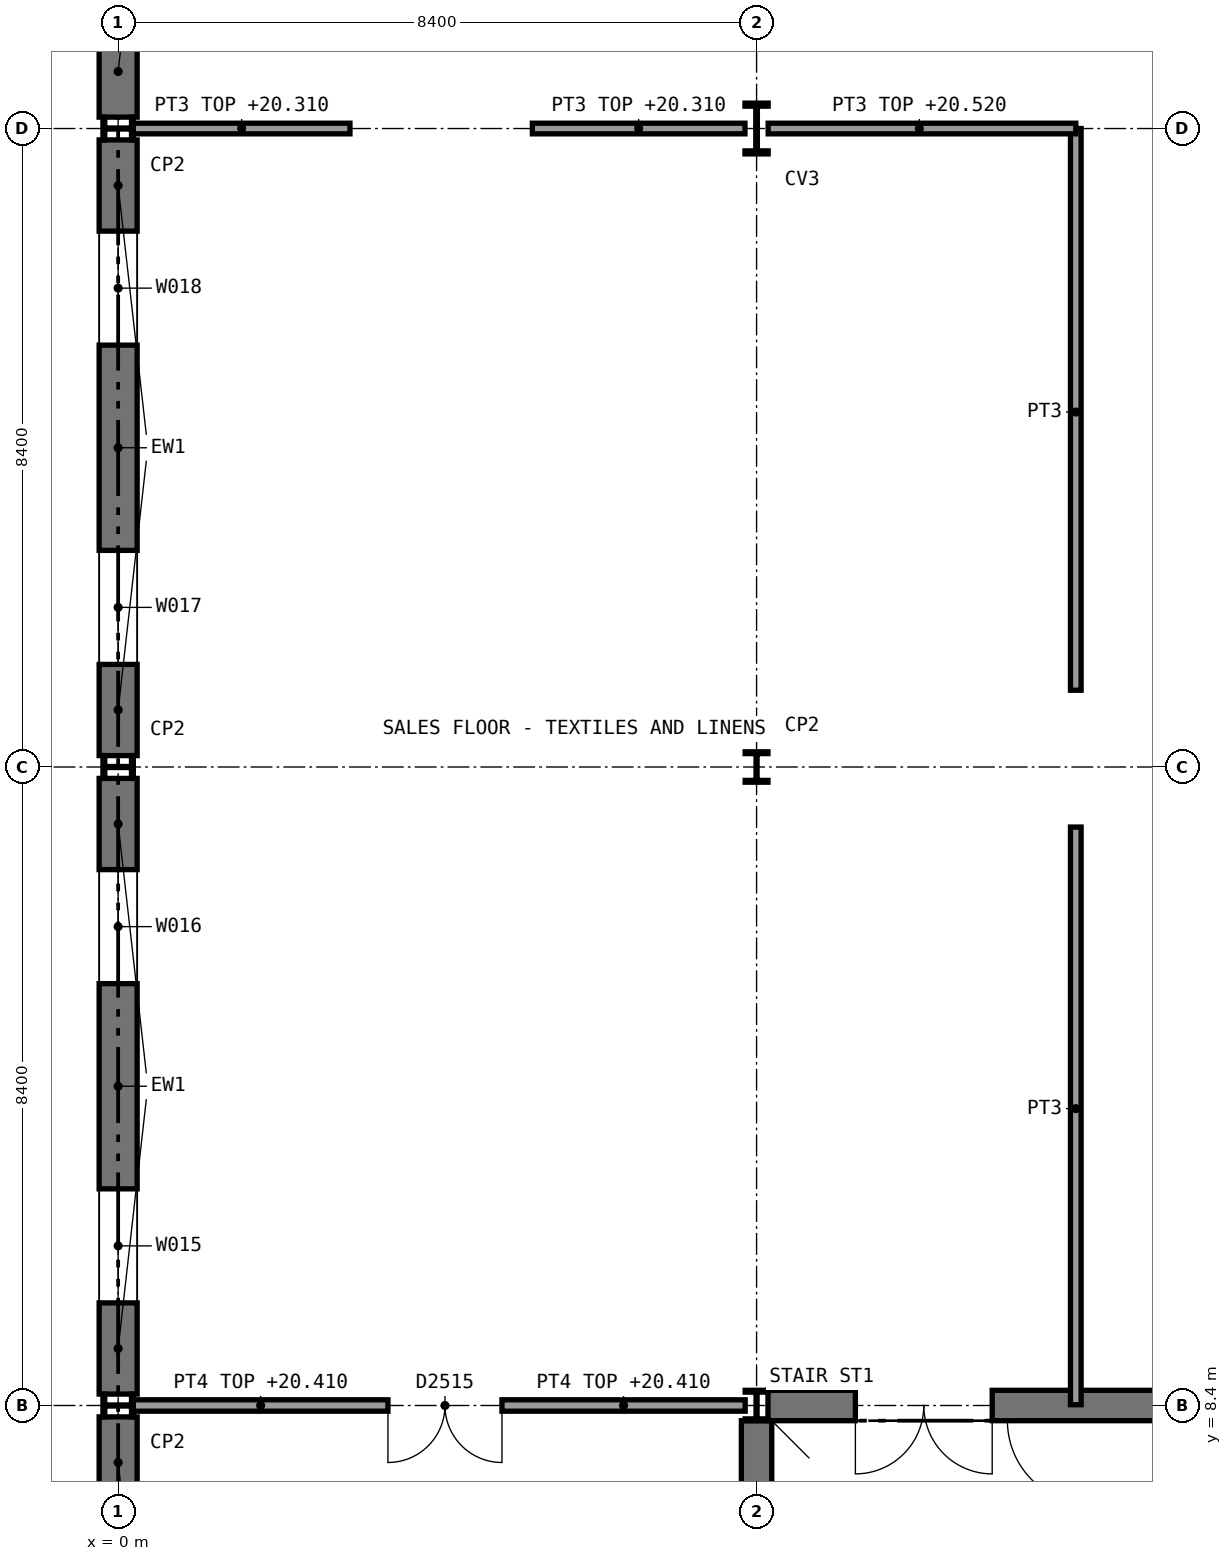
"""IFC4 building model, lengths in metres.
Left out: names, types, materials, properties, quantities, classifications, styles, units other than length and angle.
Written with IfcOpenShell. Run it as: python <this file> out.ifc"""

import sys

from ifc_helpers import new_model, si_unit, direction, frame, frame_2d, origin, origin_2d, place, context, subcontext, project, spatial, rectangle, i_section, extrude, element, fill, save


model = new_model("IFC4")
c1 = context("Model", 3, precision=1e-05, world=origin(), true_north=direction((0.0, 1.0)))
c2 = subcontext(c1, "Body", "Model", "MODEL_VIEW")
j1 = project(units=[si_unit("LENGTHUNIT", "METRE"), si_unit("PLANEANGLEUNIT", "RADIAN")], contexts=[c1])
p1 = place(None, origin())
s1 = spatial("IfcSite", under=j1, at=p1, CompositionType="ELEMENT")
p2 = place(p1, origin())
s2 = spatial("IfcBuilding", under=s1, at=p2, CompositionType="ELEMENT")
p3 = place(p2, frame((0.0, 0.0, 16.2)))
s3 = spatial("IfcBuildingStorey", under=s2, at=p3, CompositionType="ELEMENT", Elevation=16.2)
p4 = place(p3, frame((8.55, 8.4, 0.0), z_axis=(0.0, 0.0, 1.0), x_axis=(1.0, 0.0, 0.0)))
e1 = element("IfcWall", 1, at=p4, inside=s3, PredefinedType="SHEAR", context=c2, shape_type="SweptSolid", body=[
    extrude(rectangle(XDim=8.1, YDim=0.4, at=frame_2d((4.05, 0.0))), origin(), (0.0, 0.0, 1.0), 4.65),
])
p5 = place(p4, frame((1.15, 0.0, 0.0)))
e2 = element("IfcOpeningElement", 2, at=p5, cuts=e1, PredefinedType="OPENING", context=c2, shape_type="SweptSolid", body=[
    extrude(rectangle(XDim=1.8, YDim=2.1, at=frame_2d((0.9, 1.05))), frame((0.0, 0.21, 0.0), z_axis=(0.0, -1.0, 0.0), x_axis=(1.0, 0.0, 0.0)), (0.0, 0.0, 1.0), 0.42),
])
p6 = place(p4, frame((5.3, 0.0, 0.0)))
e3 = element("IfcOpeningElement", 3, at=p6, cuts=e1, PredefinedType="OPENING", context=c2, shape_type="SweptSolid", body=[
    extrude(rectangle(XDim=1.8, YDim=2.1, at=frame_2d((0.9, 1.05))), frame((0.0, 0.21, 0.0), z_axis=(0.0, -1.0, 0.0), x_axis=(1.0, 0.0, 0.0)), (0.0, 0.0, 1.0), 0.42),
])
p7 = place(p3, frame((8.4, 0.2, 0.0), z_axis=(0.0, 0.0, 1.0), x_axis=(0.0, 1.0, 0.0)))
e4 = element("IfcWall", 4, at=p7, inside=s3, PredefinedType="SHEAR", context=c2, shape_type="SweptSolid", body=[
    extrude(rectangle(XDim=8.0, YDim=0.4, at=frame_2d((4.0, 0.0))), origin(), (0.0, 0.0, 1.0), 4.65),
])
for number, where, z_axis, x_axis in (
    (5, (0.0, 8.4, 0.0), (0.0, 0.0, 1.0), (0.0, 1.0, 0.0)),
    (6, (0.0, 16.8, 0.0), (0.0, 0.0, 1.0), (0.0, 1.0, 0.0)),
    (7, (0.0, 25.2, 0.0), (0.0, 0.0, 1.0), (0.0, 1.0, 0.0)),
    (8, (8.4, 8.4, 0.0), (0.0, 0.0, 1.0), (1.0, 0.0, 0.0)),
    (9, (8.4, 16.8, 0.0), (0.0, 0.0, 1.0), (1.0, 0.0, 0.0)),
):
    element("IfcColumn", number, at=place(p3, frame(where, z_axis=z_axis, x_axis=x_axis)), inside=s3, PredefinedType="COLUMN", context=c2, shape_type="SweptSolid", body=[
        extrude(i_section(OverallWidth=0.3, OverallDepth=0.4, WebThickness=0.013, FlangeThickness=0.024, FilletRadius=0.027, at=origin_2d()), origin(), (0.0, 0.0, 1.0), 4.8),
    ])
p8 = place(p3, frame((8.4, 25.2, 0.0), z_axis=(0.0, 0.0, 1.0), x_axis=(1.0, 0.0, 0.0)))
e10 = element("IfcColumn", 10, at=p8, inside=s3, PredefinedType="COLUMN", context=c2, shape_type="SweptSolid", body=[
    extrude(i_section(OverallWidth=0.305, OverallDepth=0.668, WebThickness=0.021, FlangeThickness=0.04, FilletRadius=0.027, at=origin_2d()), origin(), (0.0, 0.0, 1.0), 4.8),
])
p9 = place(p3, frame((0.2, 8.4, 0.0), z_axis=(0.0, 0.0, 1.0), x_axis=(1.0, 0.0, 0.0)))
e11 = element("IfcWall", 11, at=p9, inside=s3, PredefinedType="SOLIDWALL", context=c2, shape_type="SweptSolid", body=[
    extrude(rectangle(XDim=8.05, YDim=0.15, at=frame_2d((4.025, 0.0))), origin(), (0.0, 0.0, 1.0), 4.21),
])
p10 = place(p9, frame((3.35, 0.0, 0.0)))
e12 = element("IfcOpeningElement", 12, at=p10, cuts=e11, PredefinedType="OPENING", context=c2, shape_type="SweptSolid", body=[
    extrude(rectangle(XDim=1.5, YDim=2.1, at=frame_2d((0.75, 1.05))), frame((0.0, 0.085, 0.0), z_axis=(0.0, -1.0, 0.0), x_axis=(1.0, 0.0, 0.0)), (0.0, 0.0, 1.0), 0.17),
])
p11 = place(p3, frame((12.6, 8.41, 0.0), z_axis=(0.0, 0.0, 1.0), x_axis=(0.0, 1.0, 0.0)))
e13 = element("IfcWall", 13, at=p11, inside=s3, PredefinedType="PARTITIONING", context=c2, shape_type="SweptSolid", body=[
    extrude(rectangle(XDim=7.6, YDim=0.14, at=frame_2d((3.8, 0.0))), origin(), (0.0, 0.0, 1.0), 4.65),
])
p12 = place(p3, frame((12.6, 17.81, 0.0), z_axis=(0.0, 0.0, 1.0), x_axis=(0.0, 1.0, 0.0)))
e14 = element("IfcWall", 14, at=p12, inside=s3, PredefinedType="PARTITIONING", context=c2, shape_type="SweptSolid", body=[
    extrude(rectangle(XDim=7.39, YDim=0.14, at=frame_2d((3.695, 0.0))), origin(), (0.0, 0.0, 1.0), 4.65),
])
p13 = place(p3, frame((0.2, 25.2, 0.0), z_axis=(0.0, 0.0, 1.0), x_axis=(1.0, 0.0, 0.0)))
e15 = element("IfcWall", 15, at=p13, inside=s3, PredefinedType="PARTITIONING", context=c2, shape_type="SweptSolid", body=[
    extrude(rectangle(XDim=2.85, YDim=0.14, at=frame_2d((1.425, 0.0))), origin(), (0.0, 0.0, 1.0), 4.11),
])
p14 = place(p3, frame((5.45, 25.2, 0.0), z_axis=(0.0, 0.0, 1.0), x_axis=(1.0, 0.0, 0.0)))
e16 = element("IfcWall", 16, at=p14, inside=s3, PredefinedType="PARTITIONING", context=c2, shape_type="SweptSolid", body=[
    extrude(rectangle(XDim=2.797, YDim=0.14, at=frame_2d((1.399, 0.0))), origin(), (0.0, 0.0, 1.0), 4.11),
])
p15 = place(p3, frame((8.552, 25.2, 0.0), z_axis=(0.0, 0.0, 1.0), x_axis=(1.0, 0.0, 0.0)))
e17 = element("IfcWall", 17, at=p15, inside=s3, PredefinedType="PARTITIONING", context=c2, shape_type="SweptSolid", body=[
    extrude(rectangle(XDim=4.048, YDim=0.14, at=frame_2d((2.024, 0.0))), origin(), (0.0, 0.0, 1.0), 4.32),
])
p16 = place(p3, frame((0.0, 0.15, 0.0), z_axis=(0.0, 0.0, 1.0), x_axis=(0.0, 1.0, 0.0)))
e18 = element("IfcWall", 18, at=p16, inside=s3, PredefinedType="STANDARD", context=c2, shape_type="SweptSolid", body=[
    extrude(rectangle(XDim=8.1, YDim=0.5, at=frame_2d((4.05, 0.0))), origin(), (0.0, 0.0, 1.0), 4.65),
])
p17 = place(p16, frame((1.2, 0.0, 1.0)))
e19 = element("IfcOpeningElement", 19, at=p17, cuts=e18, PredefinedType="OPENING", context=c2, shape_type="SweptSolid", body=[
    extrude(rectangle(XDim=1.5, YDim=2.7, at=frame_2d((0.75, 1.35))), frame((0.0, 0.26, 0.0), z_axis=(0.0, -1.0, 0.0), x_axis=(1.0, 0.0, 0.0)), (0.0, 0.0, 1.0), 0.52),
])
p18 = place(p16, frame((5.4, 0.0, 1.0)))
e20 = element("IfcOpeningElement", 20, at=p18, cuts=e18, PredefinedType="OPENING", context=c2, shape_type="SweptSolid", body=[
    extrude(rectangle(XDim=1.5, YDim=2.7, at=frame_2d((0.75, 1.35))), frame((0.0, 0.26, 0.0), z_axis=(0.0, -1.0, 0.0), x_axis=(1.0, 0.0, 0.0)), (0.0, 0.0, 1.0), 0.52),
])
p19 = place(p3, frame((0.0, 8.55, 0.0), z_axis=(0.0, 0.0, 1.0), x_axis=(0.0, 1.0, 0.0)))
e21 = element("IfcWall", 21, at=p19, inside=s3, PredefinedType="STANDARD", context=c2, shape_type="SweptSolid", body=[
    extrude(rectangle(XDim=8.1, YDim=0.5, at=frame_2d((4.05, 0.0))), origin(), (0.0, 0.0, 1.0), 4.65),
])
p20 = place(p19, frame((1.2, 0.0, 1.0)))
e22 = element("IfcOpeningElement", 22, at=p20, cuts=e21, PredefinedType="OPENING", context=c2, shape_type="SweptSolid", body=[
    extrude(rectangle(XDim=1.5, YDim=2.7, at=frame_2d((0.75, 1.35))), frame((0.0, 0.26, 0.0), z_axis=(0.0, -1.0, 0.0), x_axis=(1.0, 0.0, 0.0)), (0.0, 0.0, 1.0), 0.52),
])
p21 = place(p19, frame((5.4, 0.0, 1.0)))
e23 = element("IfcOpeningElement", 23, at=p21, cuts=e21, PredefinedType="OPENING", context=c2, shape_type="SweptSolid", body=[
    extrude(rectangle(XDim=1.5, YDim=2.7, at=frame_2d((0.75, 1.35))), frame((0.0, 0.26, 0.0), z_axis=(0.0, -1.0, 0.0), x_axis=(1.0, 0.0, 0.0)), (0.0, 0.0, 1.0), 0.52),
])
p22 = place(p3, frame((0.0, 16.95, 0.0), z_axis=(0.0, 0.0, 1.0), x_axis=(0.0, 1.0, 0.0)))
e24 = element("IfcWall", 24, at=p22, inside=s3, PredefinedType="STANDARD", context=c2, shape_type="SweptSolid", body=[
    extrude(rectangle(XDim=8.1, YDim=0.5, at=frame_2d((4.05, 0.0))), origin(), (0.0, 0.0, 1.0), 4.65),
])
p23 = place(p22, frame((1.2, 0.0, 1.0)))
e25 = element("IfcOpeningElement", 25, at=p23, cuts=e24, PredefinedType="OPENING", context=c2, shape_type="SweptSolid", body=[
    extrude(rectangle(XDim=1.5, YDim=2.7, at=frame_2d((0.75, 1.35))), frame((0.0, 0.26, 0.0), z_axis=(0.0, -1.0, 0.0), x_axis=(1.0, 0.0, 0.0)), (0.0, 0.0, 1.0), 0.52),
])
p24 = place(p22, frame((5.4, 0.0, 1.0)))
e26 = element("IfcOpeningElement", 26, at=p24, cuts=e24, PredefinedType="OPENING", context=c2, shape_type="SweptSolid", body=[
    extrude(rectangle(XDim=1.5, YDim=2.7, at=frame_2d((0.75, 1.35))), frame((0.0, 0.26, 0.0), z_axis=(0.0, -1.0, 0.0), x_axis=(1.0, 0.0, 0.0)), (0.0, 0.0, 1.0), 0.52),
])
p25 = place(p3, frame((0.0, 25.35, 0.0), z_axis=(0.0, 0.0, 1.0), x_axis=(0.0, 1.0, 0.0)))
e27 = element("IfcWall", 27, at=p25, inside=s3, PredefinedType="STANDARD", context=c2, shape_type="SweptSolid", body=[
    extrude(rectangle(XDim=12.3, YDim=0.5, at=frame_2d((6.15, 0.0))), origin(), (0.0, 0.0, 1.0), 4.65),
])
p26 = place(p25, frame((1.2, 0.0, 1.0)))
e28 = element("IfcOpeningElement", 28, at=p26, cuts=e27, PredefinedType="OPENING", context=c2, shape_type="SweptSolid", body=[
    extrude(rectangle(XDim=1.5, YDim=2.7, at=frame_2d((0.75, 1.35))), frame((0.0, 0.26, 0.0), z_axis=(0.0, -1.0, 0.0), x_axis=(1.0, 0.0, 0.0)), (0.0, 0.0, 1.0), 0.52),
])
p27 = place(p25, frame((5.4, 0.0, 1.0)))
e29 = element("IfcOpeningElement", 29, at=p27, cuts=e27, PredefinedType="OPENING", context=c2, shape_type="SweptSolid", body=[
    extrude(rectangle(XDim=1.5, YDim=2.7, at=frame_2d((0.75, 1.35))), frame((0.0, 0.26, 0.0), z_axis=(0.0, -1.0, 0.0), x_axis=(1.0, 0.0, 0.0)), (0.0, 0.0, 1.0), 0.52),
])
p28 = place(p25, frame((9.6, 0.0, 1.0)))
e30 = element("IfcOpeningElement", 30, at=p28, cuts=e27, PredefinedType="OPENING", context=c2, shape_type="SweptSolid", body=[
    extrude(rectangle(XDim=1.5, YDim=2.7, at=frame_2d((0.75, 1.35))), frame((0.0, 0.26, 0.0), z_axis=(0.0, -1.0, 0.0), x_axis=(1.0, 0.0, 0.0)), (0.0, 0.0, 1.0), 0.52),
])
p29 = place(p3, frame((12.8, 0.2, 0.0), z_axis=(0.0, 0.0, 1.0), x_axis=(0.0, 1.0, 0.0)))
e31 = element("IfcWall", 31, at=p29, inside=s3, PredefinedType="SHEAR", context=c2, shape_type="SweptSolid", body=[
    extrude(rectangle(XDim=8.0, YDim=0.2, at=frame_2d((4.0, 0.0))), origin(), (0.0, 0.0, 1.0), 4.65),
])
p30 = place(p29, frame((6.9, 0.0, 0.0)))
e32 = element("IfcOpeningElement", 32, at=p30, cuts=e31, PredefinedType="OPENING", context=c2, shape_type="SweptSolid", body=[
    extrude(rectangle(XDim=1.11, YDim=2.1, at=frame_2d((0.555, 1.05))), frame((0.0, 0.11, 0.0), z_axis=(0.0, -1.0, 0.0), x_axis=(1.0, 0.0, 0.0)), (0.0, 0.0, 1.0), 0.22),
])
p31 = place(p10, frame((1.5, 0.0, 0.0), z_axis=(0.0, 0.0, 1.0), x_axis=(-1.0, 0.0, 0.0)))
e33 = element("IfcDoor", 33, at=p31, inside=s3, OperationType="DOUBLE_DOOR_SINGLE_SWING", PredefinedType="DOOR", context=c2, shape_type="SweptSolid", body=[
    extrude(rectangle(XDim=1.5, YDim=2.1, at=frame_2d((0.75, 1.05))), frame((0.0, 0.025, 0.0), z_axis=(0.0, -1.0, 0.0), x_axis=(1.0, 0.0, 0.0)), (0.0, 0.0, 1.0), 0.05),
])
fill(e12, e33)
p32 = place(p20, origin())
e34 = element("IfcWindow", 34, at=p32, inside=s3, PartitioningType="SINGLE_PANEL", PredefinedType="WINDOW", context=c2, shape_type="SweptSolid", body=[
    extrude(rectangle(XDim=1.5, YDim=2.7, at=frame_2d((0.75, 1.35))), frame((0.0, 0.03, 0.0), z_axis=(0.0, -1.0, 0.0), x_axis=(1.0, 0.0, 0.0)), (0.0, 0.0, 1.0), 0.06),
])
fill(e22, e34)
p33 = place(p21, origin())
e35 = element("IfcWindow", 35, at=p33, inside=s3, PartitioningType="SINGLE_PANEL", PredefinedType="WINDOW", context=c2, shape_type="SweptSolid", body=[
    extrude(rectangle(XDim=1.5, YDim=2.7, at=frame_2d((0.75, 1.35))), frame((0.0, 0.03, 0.0), z_axis=(0.0, -1.0, 0.0), x_axis=(1.0, 0.0, 0.0)), (0.0, 0.0, 1.0), 0.06),
])
fill(e23, e35)
p34 = place(p23, origin())
e36 = element("IfcWindow", 36, at=p34, inside=s3, PartitioningType="SINGLE_PANEL", PredefinedType="WINDOW", context=c2, shape_type="SweptSolid", body=[
    extrude(rectangle(XDim=1.5, YDim=2.7, at=frame_2d((0.75, 1.35))), frame((0.0, 0.03, 0.0), z_axis=(0.0, -1.0, 0.0), x_axis=(1.0, 0.0, 0.0)), (0.0, 0.0, 1.0), 0.06),
])
fill(e25, e36)
p35 = place(p24, origin())
e37 = element("IfcWindow", 37, at=p35, inside=s3, PartitioningType="SINGLE_PANEL", PredefinedType="WINDOW", context=c2, shape_type="SweptSolid", body=[
    extrude(rectangle(XDim=1.5, YDim=2.7, at=frame_2d((0.75, 1.35))), frame((0.0, 0.03, 0.0), z_axis=(0.0, -1.0, 0.0), x_axis=(1.0, 0.0, 0.0)), (0.0, 0.0, 1.0), 0.06),
])
fill(e26, e37)
p36 = place(p30, origin())
e38 = element("IfcDoor", 38, at=p36, inside=s3, OperationType="SINGLE_SWING_RIGHT", PredefinedType="DOOR", context=c2, shape_type="SweptSolid", body=[
    extrude(rectangle(XDim=1.1, YDim=2.1, at=frame_2d((0.55, 1.05))), frame((0.0, 0.025, 0.0), z_axis=(0.0, -1.0, 0.0), x_axis=(1.0, 0.0, 0.0)), (0.0, 0.0, 1.0), 0.05),
])
fill(e32, e38)
p37 = place(p5, frame((1.8, 0.0, 0.0), z_axis=(0.0, 0.0, 1.0), x_axis=(-1.0, 0.0, 0.0)))
e39 = element("IfcDoor", 39, at=p37, inside=s3, OperationType="DOUBLE_DOOR_SINGLE_SWING", PredefinedType="DOOR", context=c2, shape_type="SweptSolid", body=[
    extrude(rectangle(XDim=1.8, YDim=2.1, at=frame_2d((0.9, 1.05))), frame((0.0, 0.025, 0.0), z_axis=(0.0, -1.0, 0.0), x_axis=(1.0, 0.0, 0.0)), (0.0, 0.0, 1.0), 0.05),
])
fill(e2, e39)
save(model, sys.argv[1])
